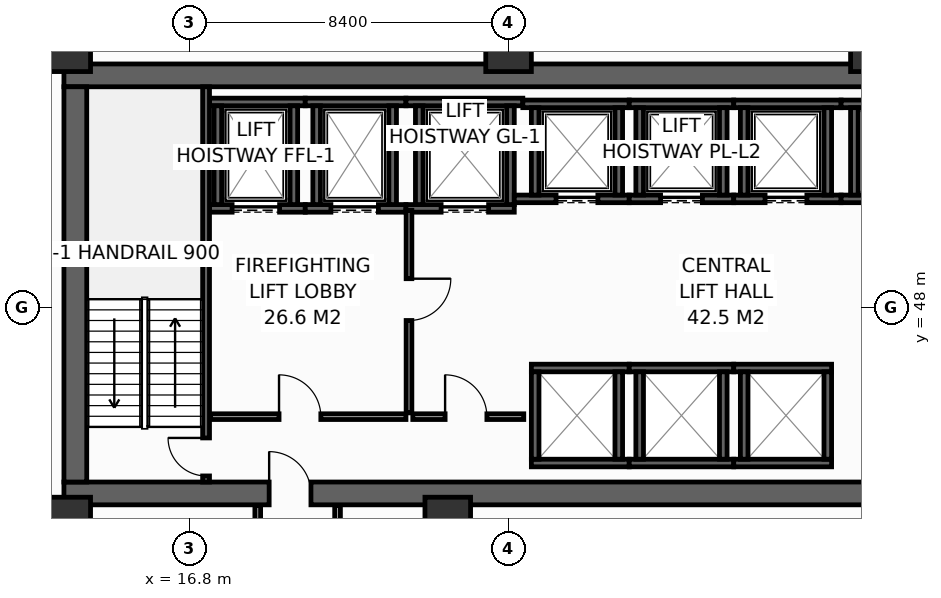
"""IFC4 building model, lengths in metres.
Left out: names, types, materials, properties, quantities, classifications, styles, units other than length and angle.
Written with IfcOpenShell. Run it as: python <this file> out.ifc"""

import sys

from ifc_helpers import new_model, si_unit, direction, frame, frame_2d, origin, origin_2d, place, context, subcontext, project, spatial, rectangle, hollow_rectangle, extrude, element, fill, save


model = new_model("IFC4")
c1 = context("Model", 3, precision=1e-05, world=origin(), true_north=direction((0.0, 1.0)))
c2 = subcontext(c1, "Body", "Model", "MODEL_VIEW")
j1 = project(units=[si_unit("LENGTHUNIT", "METRE"), si_unit("PLANEANGLEUNIT", "RADIAN")], contexts=[c1])
p1 = place(None, origin())
s1 = spatial("IfcSite", under=j1, at=p1, CompositionType="ELEMENT")
p2 = place(p1, origin())
s2 = spatial("IfcBuilding", under=s1, at=p2, CompositionType="ELEMENT")
p3 = place(p2, frame((0.0, 0.0, 60.4)))
s3 = spatial("IfcBuildingStorey", under=s2, at=p3, CompositionType="ELEMENT", Elevation=60.4)
p4 = place(p3, frame((13.5, 43.1, 0.0), z_axis=(0.0, 0.0, 1.0), x_axis=(1.0, 0.0, 0.0)))
e1 = element("IfcWall", 1, at=p4, inside=s3, PredefinedType="SHEAR", context=c2, shape_type="SweptSolid", body=[
    extrude(rectangle(XDim=32.9, YDim=0.6, at=frame_2d((16.45, 0.0))), origin(), (0.0, 0.0, 1.0), 4.15),
])
p5 = place(p4, frame((5.4, 0.0, 0.0)))
e2 = element("IfcOpeningElement", 2, at=p5, cuts=e1, PredefinedType="OPENING", context=c2, shape_type="SweptSolid", body=[
    extrude(rectangle(XDim=1.1, YDim=2.15, at=frame_2d((0.55, 1.075))), frame((0.0, 0.31, 0.0), z_axis=(0.0, -1.0, 0.0), x_axis=(1.0, 0.0, 0.0)), (0.0, 0.0, 1.0), 0.62),
])
p6 = place(p4, frame((25.6, 0.0, 0.0)))
e3 = element("IfcOpeningElement", 3, at=p6, cuts=e1, PredefinedType="OPENING", context=c2, shape_type="SweptSolid", body=[
    extrude(rectangle(XDim=1.1, YDim=2.15, at=frame_2d((0.55, 1.075))), frame((0.0, 0.31, 0.0), z_axis=(0.0, -1.0, 0.0), x_axis=(1.0, 0.0, 0.0)), (0.0, 0.0, 1.0), 0.62),
])
p7 = place(p3, frame((13.5, 54.1, 0.0), z_axis=(0.0, 0.0, 1.0), x_axis=(1.0, 0.0, 0.0)))
e4 = element("IfcWall", 4, at=p7, inside=s3, PredefinedType="SHEAR", context=c2, shape_type="SweptSolid", body=[
    extrude(rectangle(XDim=32.9, YDim=0.6, at=frame_2d((16.45, 0.0))), origin(), (0.0, 0.0, 1.0), 4.15),
])
p8 = place(p3, frame((13.8, 43.4, 0.0), z_axis=(0.0, 0.0, 1.0), x_axis=(0.0, 1.0, 0.0)))
e5 = element("IfcWall", 5, at=p8, inside=s3, PredefinedType="SHEAR", context=c2, shape_type="SweptSolid", body=[
    extrude(rectangle(XDim=10.4, YDim=0.6, at=frame_2d((5.2, 0.0))), origin(), (0.0, 0.0, 1.0), 4.15),
])
for number, where, z_axis, x_axis in (
    (6, (13.6, 54.8, 0.0), (0.0, 0.0, 1.0), (1.0, 0.0, 0.0)),
    (7, (25.2, 54.8, 0.0), (0.0, 0.0, 1.0), (1.0, 0.0, 0.0)),
    (8, (34.8, 54.8, 0.0), (0.0, 0.0, 1.0), (1.0, 0.0, 0.0)),
    (9, (13.6, 42.4, 0.0), (0.0, 0.0, 1.0), (1.0, 0.0, 0.0)),
    (10, (23.6, 42.4, 0.0), (0.0, 0.0, 1.0), (1.0, 0.0, 0.0)),
):
    element("IfcColumn", number, at=place(p3, frame(where, z_axis=z_axis, x_axis=x_axis)), inside=s3, PredefinedType="COLUMN", context=c2, shape_type="SweptSolid", body=[
        extrude(hollow_rectangle(XDim=1.2, YDim=1.2, WallThickness=0.055, at=origin_2d()), origin(), (0.0, 0.0, 1.0), 4.4),
    ])
p9 = place(p3, frame((17.33, 50.6, 0.0), z_axis=(0.0, 0.0, 1.0), x_axis=(1.0, 0.0, 0.0)))
e11 = element("IfcWall", 11, at=p9, inside=s3, PredefinedType="SHEAR", context=c2, shape_type="SweptSolid", body=[
    extrude(rectangle(XDim=2.52, YDim=0.2, at=frame_2d((1.26, 0.0))), origin(), (0.0, 0.0, 1.0), 4.15),
])
p10 = place(p9, frame((0.595, 0.0, 0.0)))
e12 = element("IfcOpeningElement", 12, at=p10, cuts=e11, PredefinedType="OPENING", context=c2, shape_type="SweptSolid", body=[
    extrude(rectangle(XDim=1.25, YDim=2.3, at=frame_2d((0.625, 1.15))), frame((0.0, 0.11, 0.0), z_axis=(0.0, -1.0, 0.0), x_axis=(1.0, 0.0, 0.0)), (0.0, 0.0, 1.0), 0.22),
])
p11 = place(p3, frame((17.33, 53.4, 0.0), z_axis=(0.0, 0.0, 1.0), x_axis=(1.0, 0.0, 0.0)))
e13 = element("IfcWall", 13, at=p11, inside=s3, PredefinedType="SHEAR", context=c2, shape_type="SweptSolid", body=[
    extrude(rectangle(XDim=2.52, YDim=0.2, at=frame_2d((1.26, 0.0))), origin(), (0.0, 0.0, 1.0), 4.15),
])
for number, where, z_axis, x_axis in (
    (14, (17.55, 50.7, 0.0), (0.0, 0.0, 1.0), (0.0, 1.0, 0.0)),
    (15, (19.55, 50.7, 0.0), (0.0, 0.0, 1.0), (0.0, 1.0, 0.0)),
):
    element("IfcWall", number, at=place(p3, frame(where, z_axis=z_axis, x_axis=x_axis)), inside=s3, PredefinedType="SHEAR", context=c2, shape_type="SweptSolid", body=[
        extrude(rectangle(XDim=2.6, YDim=0.2, at=frame_2d((1.3, 0.0))), origin(), (0.0, 0.0, 1.0), 4.15),
    ])
p12 = place(p3, frame((19.85, 50.6, 0.0), z_axis=(0.0, 0.0, 1.0), x_axis=(1.0, 0.0, 0.0)))
e16 = element("IfcWall", 16, at=p12, inside=s3, PredefinedType="SHEAR", context=c2, shape_type="SweptSolid", body=[
    extrude(rectangle(XDim=2.65, YDim=0.2, at=frame_2d((1.325, 0.0))), origin(), (0.0, 0.0, 1.0), 4.15),
])
p13 = place(p12, frame((0.675, 0.0, 0.0)))
e17 = element("IfcOpeningElement", 17, at=p13, cuts=e16, PredefinedType="OPENING", context=c2, shape_type="SweptSolid", body=[
    extrude(rectangle(XDim=1.25, YDim=2.3, at=frame_2d((0.625, 1.15))), frame((0.0, 0.11, 0.0), z_axis=(0.0, -1.0, 0.0), x_axis=(1.0, 0.0, 0.0)), (0.0, 0.0, 1.0), 0.22),
])
p14 = place(p3, frame((19.85, 53.4, 0.0), z_axis=(0.0, 0.0, 1.0), x_axis=(1.0, 0.0, 0.0)))
e18 = element("IfcWall", 18, at=p14, inside=s3, PredefinedType="SHEAR", context=c2, shape_type="SweptSolid", body=[
    extrude(rectangle(XDim=2.65, YDim=0.2, at=frame_2d((1.325, 0.0))), origin(), (0.0, 0.0, 1.0), 4.15),
])
for number, where, z_axis, x_axis in (
    (19, (20.15, 50.7, 0.0), (0.0, 0.0, 1.0), (0.0, 1.0, 0.0)),
    (20, (22.15, 50.7, 0.0), (0.0, 0.0, 1.0), (0.0, 1.0, 0.0)),
):
    element("IfcWall", number, at=place(p3, frame(where, z_axis=z_axis, x_axis=x_axis)), inside=s3, PredefinedType="SHEAR", context=c2, shape_type="SweptSolid", body=[
        extrude(rectangle(XDim=2.6, YDim=0.2, at=frame_2d((1.3, 0.0))), origin(), (0.0, 0.0, 1.0), 4.15),
    ])
p15 = place(p3, frame((22.5, 50.6, 0.0), z_axis=(0.0, 0.0, 1.0), x_axis=(1.0, 0.0, 0.0)))
e21 = element("IfcWall", 21, at=p15, inside=s3, PredefinedType="SHEAR", context=c2, shape_type="SweptSolid", body=[
    extrude(rectangle(XDim=2.85, YDim=0.2, at=frame_2d((1.425, 0.0))), origin(), (0.0, 0.0, 1.0), 4.15),
])
p16 = place(p15, frame((0.925, 0.0, 0.0)))
e22 = element("IfcOpeningElement", 22, at=p16, cuts=e21, PredefinedType="OPENING", context=c2, shape_type="SweptSolid", body=[
    extrude(rectangle(XDim=1.25, YDim=2.3, at=frame_2d((0.625, 1.15))), frame((0.0, 0.11, 0.0), z_axis=(0.0, -1.0, 0.0), x_axis=(1.0, 0.0, 0.0)), (0.0, 0.0, 1.0), 0.22),
])
p17 = place(p3, frame((22.5, 53.4, 0.0), z_axis=(0.0, 0.0, 1.0), x_axis=(1.0, 0.0, 0.0)))
e23 = element("IfcWall", 23, at=p17, inside=s3, PredefinedType="SHEAR", context=c2, shape_type="SweptSolid", body=[
    extrude(rectangle(XDim=3.075, YDim=0.2, at=frame_2d((1.538, 0.0))), origin(), (0.0, 0.0, 1.0), 4.15),
])
for number, where, z_axis, x_axis in (
    (24, (22.85, 50.7, 0.0), (0.0, 0.0, 1.0), (0.0, 1.0, 0.0)),
    (25, (25.25, 50.7, 0.0), (0.0, 0.0, 1.0), (0.0, 1.0, 0.0)),
):
    element("IfcWall", number, at=place(p3, frame(where, z_axis=z_axis, x_axis=x_axis)), inside=s3, PredefinedType="SHEAR", context=c2, shape_type="SweptSolid", body=[
        extrude(rectangle(XDim=2.6, YDim=0.2, at=frame_2d((1.3, 0.0))), origin(), (0.0, 0.0, 1.0), 4.15),
    ])
p18 = place(p3, frame((25.35, 50.85, 0.0), z_axis=(0.0, 0.0, 1.0), x_axis=(1.0, 0.0, 0.0)))
e26 = element("IfcWall", 26, at=p18, inside=s3, PredefinedType="SHEAR", context=c2, shape_type="SweptSolid", body=[
    extrude(rectangle(XDim=3.025, YDim=0.2, at=frame_2d((1.512, 0.0))), origin(), (0.0, 0.0, 1.0), 4.15),
])
p19 = place(p18, frame((1.1, 0.0, 0.0)))
e27 = element("IfcOpeningElement", 27, at=p19, cuts=e26, PredefinedType="OPENING", context=c2, shape_type="SweptSolid", body=[
    extrude(rectangle(XDim=1.1, YDim=2.2, at=frame_2d((0.55, 1.1))), frame((0.0, 0.11, 0.0), z_axis=(0.0, -1.0, 0.0), x_axis=(1.0, 0.0, 0.0)), (0.0, 0.0, 1.0), 0.22),
])
p20 = place(p3, frame((25.575, 53.35, 0.0), z_axis=(0.0, 0.0, 1.0), x_axis=(1.0, 0.0, 0.0)))
e28 = element("IfcWall", 28, at=p20, inside=s3, PredefinedType="SHEAR", context=c2, shape_type="SweptSolid", body=[
    extrude(rectangle(XDim=2.8, YDim=0.2, at=frame_2d((1.4, 0.0))), origin(), (0.0, 0.0, 1.0), 4.15),
])
for number, where, z_axis, x_axis in (
    (29, (25.9, 50.95, 0.0), (0.0, 0.0, 1.0), (0.0, 1.0, 0.0)),
    (30, (28.1, 50.95, 0.0), (0.0, 0.0, 1.0), (0.0, 1.0, 0.0)),
):
    element("IfcWall", number, at=place(p3, frame(where, z_axis=z_axis, x_axis=x_axis)), inside=s3, PredefinedType="SHEAR", context=c2, shape_type="SweptSolid", body=[
        extrude(rectangle(XDim=2.3, YDim=0.2, at=frame_2d((1.15, 0.0))), origin(), (0.0, 0.0, 1.0), 4.15),
    ])
p21 = place(p3, frame((28.375, 50.85, 0.0), z_axis=(0.0, 0.0, 1.0), x_axis=(1.0, 0.0, 0.0)))
e31 = element("IfcWall", 31, at=p21, inside=s3, PredefinedType="SHEAR", context=c2, shape_type="SweptSolid", body=[
    extrude(rectangle(XDim=2.75, YDim=0.2, at=frame_2d((1.375, 0.0))), origin(), (0.0, 0.0, 1.0), 4.15),
])
p22 = place(p21, frame((0.825, 0.0, 0.0)))
e32 = element("IfcOpeningElement", 32, at=p22, cuts=e31, PredefinedType="OPENING", context=c2, shape_type="SweptSolid", body=[
    extrude(rectangle(XDim=1.1, YDim=2.2, at=frame_2d((0.55, 1.1))), frame((0.0, 0.11, 0.0), z_axis=(0.0, -1.0, 0.0), x_axis=(1.0, 0.0, 0.0)), (0.0, 0.0, 1.0), 0.22),
])
p23 = place(p3, frame((28.375, 53.35, 0.0), z_axis=(0.0, 0.0, 1.0), x_axis=(1.0, 0.0, 0.0)))
e33 = element("IfcWall", 33, at=p23, inside=s3, PredefinedType="SHEAR", context=c2, shape_type="SweptSolid", body=[
    extrude(rectangle(XDim=2.75, YDim=0.2, at=frame_2d((1.375, 0.0))), origin(), (0.0, 0.0, 1.0), 4.15),
])
for number, where, z_axis, x_axis in (
    (34, (28.65, 50.95, 0.0), (0.0, 0.0, 1.0), (0.0, 1.0, 0.0)),
    (35, (30.85, 50.95, 0.0), (0.0, 0.0, 1.0), (0.0, 1.0, 0.0)),
):
    element("IfcWall", number, at=place(p3, frame(where, z_axis=z_axis, x_axis=x_axis)), inside=s3, PredefinedType="SHEAR", context=c2, shape_type="SweptSolid", body=[
        extrude(rectangle(XDim=2.3, YDim=0.2, at=frame_2d((1.15, 0.0))), origin(), (0.0, 0.0, 1.0), 4.15),
    ])
p24 = place(p3, frame((31.125, 50.85, 0.0), z_axis=(0.0, 0.0, 1.0), x_axis=(1.0, 0.0, 0.0)))
e36 = element("IfcWall", 36, at=p24, inside=s3, PredefinedType="SHEAR", context=c2, shape_type="SweptSolid", body=[
    extrude(rectangle(XDim=2.825, YDim=0.2, at=frame_2d((1.413, 0.0))), origin(), (0.0, 0.0, 1.0), 4.15),
])
p25 = place(p24, frame((0.825, 0.0, 0.0)))
e37 = element("IfcOpeningElement", 37, at=p25, cuts=e36, PredefinedType="OPENING", context=c2, shape_type="SweptSolid", body=[
    extrude(rectangle(XDim=1.1, YDim=2.2, at=frame_2d((0.55, 1.1))), frame((0.0, 0.11, 0.0), z_axis=(0.0, -1.0, 0.0), x_axis=(1.0, 0.0, 0.0)), (0.0, 0.0, 1.0), 0.22),
])
p26 = place(p3, frame((31.125, 53.35, 0.0), z_axis=(0.0, 0.0, 1.0), x_axis=(1.0, 0.0, 0.0)))
e38 = element("IfcWall", 38, at=p26, inside=s3, PredefinedType="SHEAR", context=c2, shape_type="SweptSolid", body=[
    extrude(rectangle(XDim=2.825, YDim=0.2, at=frame_2d((1.413, 0.0))), origin(), (0.0, 0.0, 1.0), 4.15),
])
for number, where, z_axis, x_axis in (
    (39, (31.4, 50.95, 0.0), (0.0, 0.0, 1.0), (0.0, 1.0, 0.0)),
    (40, (33.6, 50.95, 0.0), (0.0, 0.0, 1.0), (0.0, 1.0, 0.0)),
):
    element("IfcWall", number, at=place(p3, frame(where, z_axis=z_axis, x_axis=x_axis)), inside=s3, PredefinedType="SHEAR", context=c2, shape_type="SweptSolid", body=[
        extrude(rectangle(XDim=2.3, YDim=0.2, at=frame_2d((1.15, 0.0))), origin(), (0.0, 0.0, 1.0), 4.15),
    ])
for number, where, z_axis, x_axis in (
    (41, (25.8, 43.9, 0.0), (0.0, 0.0, 1.0), (1.0, 0.0, 0.0)),
    (42, (25.8, 46.4, 0.0), (0.0, 0.0, 1.0), (1.0, 0.0, 0.0)),
):
    element("IfcWall", number, at=place(p3, frame(where, z_axis=z_axis, x_axis=x_axis)), inside=s3, PredefinedType="SHEAR", context=c2, shape_type="SweptSolid", body=[
        extrude(rectangle(XDim=2.575, YDim=0.2, at=frame_2d((1.288, 0.0))), origin(), (0.0, 0.0, 1.0), 4.15),
    ])
for number, where, z_axis, x_axis in (
    (43, (25.9, 44.0, 0.0), (0.0, 0.0, 1.0), (0.0, 1.0, 0.0)),
    (44, (28.1, 44.0, 0.0), (0.0, 0.0, 1.0), (0.0, 1.0, 0.0)),
):
    element("IfcWall", number, at=place(p3, frame(where, z_axis=z_axis, x_axis=x_axis)), inside=s3, PredefinedType="SHEAR", context=c2, shape_type="SweptSolid", body=[
        extrude(rectangle(XDim=2.3, YDim=0.2, at=frame_2d((1.15, 0.0))), origin(), (0.0, 0.0, 1.0), 4.15),
    ])
for number, where, z_axis, x_axis in (
    (45, (28.375, 43.9, 0.0), (0.0, 0.0, 1.0), (1.0, 0.0, 0.0)),
    (46, (28.375, 46.4, 0.0), (0.0, 0.0, 1.0), (1.0, 0.0, 0.0)),
):
    element("IfcWall", number, at=place(p3, frame(where, z_axis=z_axis, x_axis=x_axis)), inside=s3, PredefinedType="SHEAR", context=c2, shape_type="SweptSolid", body=[
        extrude(rectangle(XDim=2.75, YDim=0.2, at=frame_2d((1.375, 0.0))), origin(), (0.0, 0.0, 1.0), 4.15),
    ])
for number, where, z_axis, x_axis in (
    (47, (28.65, 44.0, 0.0), (0.0, 0.0, 1.0), (0.0, 1.0, 0.0)),
    (48, (30.85, 44.0, 0.0), (0.0, 0.0, 1.0), (0.0, 1.0, 0.0)),
):
    element("IfcWall", number, at=place(p3, frame(where, z_axis=z_axis, x_axis=x_axis)), inside=s3, PredefinedType="SHEAR", context=c2, shape_type="SweptSolid", body=[
        extrude(rectangle(XDim=2.3, YDim=0.2, at=frame_2d((1.15, 0.0))), origin(), (0.0, 0.0, 1.0), 4.15),
    ])
for number, where, z_axis, x_axis in (
    (49, (31.125, 43.9, 0.0), (0.0, 0.0, 1.0), (1.0, 0.0, 0.0)),
    (50, (31.125, 46.4, 0.0), (0.0, 0.0, 1.0), (1.0, 0.0, 0.0)),
):
    element("IfcWall", number, at=place(p3, frame(where, z_axis=z_axis, x_axis=x_axis)), inside=s3, PredefinedType="SHEAR", context=c2, shape_type="SweptSolid", body=[
        extrude(rectangle(XDim=2.575, YDim=0.2, at=frame_2d((1.288, 0.0))), origin(), (0.0, 0.0, 1.0), 4.15),
    ])
for number, where, z_axis, x_axis in (
    (51, (31.4, 44.0, 0.0), (0.0, 0.0, 1.0), (0.0, 1.0, 0.0)),
    (52, (33.6, 44.0, 0.0), (0.0, 0.0, 1.0), (0.0, 1.0, 0.0)),
):
    element("IfcWall", number, at=place(p3, frame(where, z_axis=z_axis, x_axis=x_axis)), inside=s3, PredefinedType="SHEAR", context=c2, shape_type="SweptSolid", body=[
        extrude(rectangle(XDim=2.3, YDim=0.2, at=frame_2d((1.15, 0.0))), origin(), (0.0, 0.0, 1.0), 4.15),
    ])
for number, where, z_axis, x_axis in (
    (53, (33.95, 50.85, 0.0), (0.0, 0.0, 1.0), (1.0, 0.0, 0.0)),
    (54, (33.95, 53.35, 0.0), (0.0, 0.0, 1.0), (1.0, 0.0, 0.0)),
):
    element("IfcWall", number, at=place(p3, frame(where, z_axis=z_axis, x_axis=x_axis)), inside=s3, PredefinedType="SHEAR", context=c2, shape_type="SweptSolid", body=[
        extrude(rectangle(XDim=2.825, YDim=0.2, at=frame_2d((1.413, 0.0))), origin(), (0.0, 0.0, 1.0), 4.15),
    ])
p27 = place(p3, frame((34.3, 50.95, 0.0), z_axis=(0.0, 0.0, 1.0), x_axis=(0.0, 1.0, 0.0)))
e55 = element("IfcWall", 55, at=p27, inside=s3, PredefinedType="SHEAR", context=c2, shape_type="SweptSolid", body=[
    extrude(rectangle(XDim=2.3, YDim=0.2, at=frame_2d((1.15, 0.0))), origin(), (0.0, 0.0, 1.0), 4.15),
])
p28 = place(p3, frame((17.24, 43.4, 0.0), z_axis=(0.0, 0.0, 1.0), x_axis=(0.0, 1.0, 0.0)))
e56 = element("IfcWall", 56, at=p28, inside=s3, PredefinedType="SHEAR", context=c2, shape_type="SweptSolid", body=[
    extrude(rectangle(XDim=10.4, YDim=0.18, at=frame_2d((5.2, 0.0))), origin(), (0.0, 0.0, 1.0), 4.15),
])
p29 = place(p28, frame((0.16, 0.0, 0.0)))
e57 = element("IfcOpeningElement", 57, at=p29, cuts=e56, PredefinedType="OPENING", context=c2, shape_type="SweptSolid", body=[
    extrude(rectangle(XDim=1.0, YDim=2.15, at=frame_2d((0.5, 1.075))), frame((0.0, 0.1, 0.0), z_axis=(0.0, -1.0, 0.0), x_axis=(1.0, 0.0, 0.0)), (0.0, 0.0, 1.0), 0.2),
])
p30 = place(p3, frame((17.36, 45.12, 0.0), z_axis=(0.0, 0.0, 1.0), x_axis=(1.0, 0.0, 0.0)))
e58 = element("IfcWall", 58, at=p30, inside=s3, PredefinedType="PARTITIONING", context=c2, shape_type="SweptSolid", body=[
    extrude(rectangle(XDim=5.14, YDim=0.15, at=frame_2d((2.57, 0.0))), origin(), (0.0, 0.0, 1.0), 4.15),
])
p31 = place(p30, frame((1.8, 0.0, 0.0)))
e59 = element("IfcOpeningElement", 59, at=p31, cuts=e58, PredefinedType="OPENING", context=c2, shape_type="SweptSolid", body=[
    extrude(rectangle(XDim=1.1, YDim=2.15, at=frame_2d((0.55, 1.075))), frame((0.0, 0.085, 0.0), z_axis=(0.0, -1.0, 0.0), x_axis=(1.0, 0.0, 0.0)), (0.0, 0.0, 1.0), 0.17),
])
p32 = place(p3, frame((22.58, 50.55, 0.0), z_axis=(0.0, 0.0, 1.0), x_axis=(0.0, -1.0, 0.0)))
e60 = element("IfcWall", 60, at=p32, inside=s3, PredefinedType="PARTITIONING", context=c2, shape_type="SweptSolid", body=[
    extrude(rectangle(XDim=5.33, YDim=0.15, at=frame_2d((2.665, 0.0))), origin(), (0.0, 0.0, 1.0), 4.15),
])
p33 = place(p32, frame((1.8, 0.0, 0.0)))
e61 = element("IfcOpeningElement", 61, at=p33, cuts=e60, PredefinedType="OPENING", context=c2, shape_type="SweptSolid", body=[
    extrude(rectangle(XDim=1.1, YDim=2.15, at=frame_2d((0.55, 1.075))), frame((0.0, 0.085, 0.0), z_axis=(0.0, -1.0, 0.0), x_axis=(1.0, 0.0, 0.0)), (0.0, 0.0, 1.0), 0.17),
])
p34 = place(p3, frame((22.68, 45.12, 0.0), z_axis=(0.0, 0.0, 1.0), x_axis=(1.0, 0.0, 0.0)))
e62 = element("IfcWall", 62, at=p34, inside=s3, PredefinedType="PARTITIONING", context=c2, shape_type="SweptSolid", body=[
    extrude(rectangle(XDim=2.92, YDim=0.15, at=frame_2d((1.46, 0.0))), origin(), (0.0, 0.0, 1.0), 4.15),
])
p35 = place(p34, frame((0.85, 0.0, 0.0)))
e63 = element("IfcOpeningElement", 63, at=p35, cuts=e62, PredefinedType="OPENING", context=c2, shape_type="SweptSolid", body=[
    extrude(rectangle(XDim=1.1, YDim=2.15, at=frame_2d((0.55, 1.075))), frame((0.0, 0.085, 0.0), z_axis=(0.0, -1.0, 0.0), x_axis=(1.0, 0.0, 0.0)), (0.0, 0.0, 1.0), 0.17),
])
p36 = place(p3, frame((13.8, 41.23, 0.0), z_axis=(0.0, 0.0, 1.0), x_axis=(0.0, 1.0, 0.0)))
e64 = element("IfcWall", 64, at=p36, inside=s3, PredefinedType="PARTITIONING", context=c2, shape_type="SweptSolid", body=[
    extrude(rectangle(XDim=1.55, YDim=0.12, at=frame_2d((0.775, 0.0))), origin(), (0.0, 0.0, 1.0), 4.15),
])
for number, where, z_axis, x_axis in (
    (65, (18.6, 41.15, 0.0), (0.0, 0.0, 1.0), (0.0, 1.0, 0.0)),
    (66, (20.7, 41.15, 0.0), (0.0, 0.0, 1.0), (0.0, 1.0, 0.0)),
):
    element("IfcWall", number, at=place(p3, frame(where, z_axis=z_axis, x_axis=x_axis)), inside=s3, PredefinedType="PARTITIONING", context=c2, shape_type="SweptSolid", body=[
        extrude(rectangle(XDim=1.63, YDim=0.15, at=frame_2d((0.815, 0.0))), origin(), (0.0, 0.0, 1.0), 4.15),
    ])
p37 = place(p10, origin())
e67 = element("IfcDoor", 67, at=p37, inside=s3, OperationType="SLIDING_TO_LEFT", PredefinedType="DOOR", context=c2, shape_type="SweptSolid", body=[
    extrude(rectangle(XDim=1.25, YDim=2.3, at=frame_2d((0.625, 1.15))), frame((0.0, 0.025, 0.0), z_axis=(0.0, -1.0, 0.0), x_axis=(1.0, 0.0, 0.0)), (0.0, 0.0, 1.0), 0.05),
])
fill(e12, e67)
p38 = place(p13, origin())
e68 = element("IfcDoor", 68, at=p38, inside=s3, OperationType="SLIDING_TO_LEFT", PredefinedType="DOOR", context=c2, shape_type="SweptSolid", body=[
    extrude(rectangle(XDim=1.25, YDim=2.3, at=frame_2d((0.625, 1.15))), frame((0.0, 0.025, 0.0), z_axis=(0.0, -1.0, 0.0), x_axis=(1.0, 0.0, 0.0)), (0.0, 0.0, 1.0), 0.05),
])
fill(e17, e68)
p39 = place(p16, origin())
e69 = element("IfcDoor", 69, at=p39, inside=s3, OperationType="SLIDING_TO_LEFT", PredefinedType="DOOR", context=c2, shape_type="SweptSolid", body=[
    extrude(rectangle(XDim=1.25, YDim=2.3, at=frame_2d((0.625, 1.15))), frame((0.0, 0.025, 0.0), z_axis=(0.0, -1.0, 0.0), x_axis=(1.0, 0.0, 0.0)), (0.0, 0.0, 1.0), 0.05),
])
fill(e22, e69)
p40 = place(p19, origin())
e70 = element("IfcDoor", 70, at=p40, inside=s3, OperationType="SLIDING_TO_LEFT", PredefinedType="DOOR", context=c2, shape_type="SweptSolid", body=[
    extrude(rectangle(XDim=1.1, YDim=2.2, at=frame_2d((0.55, 1.1))), frame((0.0, 0.025, 0.0), z_axis=(0.0, -1.0, 0.0), x_axis=(1.0, 0.0, 0.0)), (0.0, 0.0, 1.0), 0.05),
])
fill(e27, e70)
p41 = place(p22, origin())
e71 = element("IfcDoor", 71, at=p41, inside=s3, OperationType="SLIDING_TO_LEFT", PredefinedType="DOOR", context=c2, shape_type="SweptSolid", body=[
    extrude(rectangle(XDim=1.1, YDim=2.2, at=frame_2d((0.55, 1.1))), frame((0.0, 0.025, 0.0), z_axis=(0.0, -1.0, 0.0), x_axis=(1.0, 0.0, 0.0)), (0.0, 0.0, 1.0), 0.05),
])
fill(e32, e71)
p42 = place(p25, origin())
e72 = element("IfcDoor", 72, at=p42, inside=s3, OperationType="SLIDING_TO_LEFT", PredefinedType="DOOR", context=c2, shape_type="SweptSolid", body=[
    extrude(rectangle(XDim=1.1, YDim=2.2, at=frame_2d((0.55, 1.1))), frame((0.0, 0.025, 0.0), z_axis=(0.0, -1.0, 0.0), x_axis=(1.0, 0.0, 0.0)), (0.0, 0.0, 1.0), 0.05),
])
fill(e37, e72)
p43 = place(p29, origin())
e73 = element("IfcDoor", 73, at=p43, inside=s3, OperationType="SINGLE_SWING_RIGHT", PredefinedType="DOOR", context=c2, shape_type="SweptSolid", body=[
    extrude(rectangle(XDim=1.0, YDim=2.15, at=frame_2d((0.5, 1.075))), frame((0.0, 0.025, 0.0), z_axis=(0.0, -1.0, 0.0), x_axis=(1.0, 0.0, 0.0)), (0.0, 0.0, 1.0), 0.05),
])
fill(e57, e73)
p44 = place(p31, origin())
e74 = element("IfcDoor", 74, at=p44, inside=s3, OperationType="SINGLE_SWING_LEFT", PredefinedType="DOOR", context=c2, shape_type="SweptSolid", body=[
    extrude(rectangle(XDim=1.1, YDim=2.15, at=frame_2d((0.55, 1.075))), frame((0.0, 0.025, 0.0), z_axis=(0.0, -1.0, 0.0), x_axis=(1.0, 0.0, 0.0)), (0.0, 0.0, 1.0), 0.05),
])
fill(e59, e74)
p45 = place(p33, origin())
e75 = element("IfcDoor", 75, at=p45, inside=s3, OperationType="SINGLE_SWING_LEFT", PredefinedType="DOOR", context=c2, shape_type="SweptSolid", body=[
    extrude(rectangle(XDim=1.1, YDim=2.15, at=frame_2d((0.55, 1.075))), frame((0.0, 0.025, 0.0), z_axis=(0.0, -1.0, 0.0), x_axis=(1.0, 0.0, 0.0)), (0.0, 0.0, 1.0), 0.05),
])
fill(e61, e75)
p46 = place(p35, origin())
e76 = element("IfcDoor", 76, at=p46, inside=s3, OperationType="SINGLE_SWING_LEFT", PredefinedType="DOOR", context=c2, shape_type="SweptSolid", body=[
    extrude(rectangle(XDim=1.1, YDim=2.15, at=frame_2d((0.55, 1.075))), frame((0.0, 0.025, 0.0), z_axis=(0.0, -1.0, 0.0), x_axis=(1.0, 0.0, 0.0)), (0.0, 0.0, 1.0), 0.05),
])
fill(e63, e76)
p47 = place(p5, origin())
e77 = element("IfcDoor", 77, at=p47, inside=s3, OperationType="SINGLE_SWING_LEFT", PredefinedType="DOOR", context=c2, shape_type="SweptSolid", body=[
    extrude(rectangle(XDim=1.1, YDim=2.15, at=frame_2d((0.55, 1.075))), frame((0.0, 0.025, 0.0), z_axis=(0.0, -1.0, 0.0), x_axis=(1.0, 0.0, 0.0)), (0.0, 0.0, 1.0), 0.05),
])
fill(e2, e77)
save(model, sys.argv[1])
